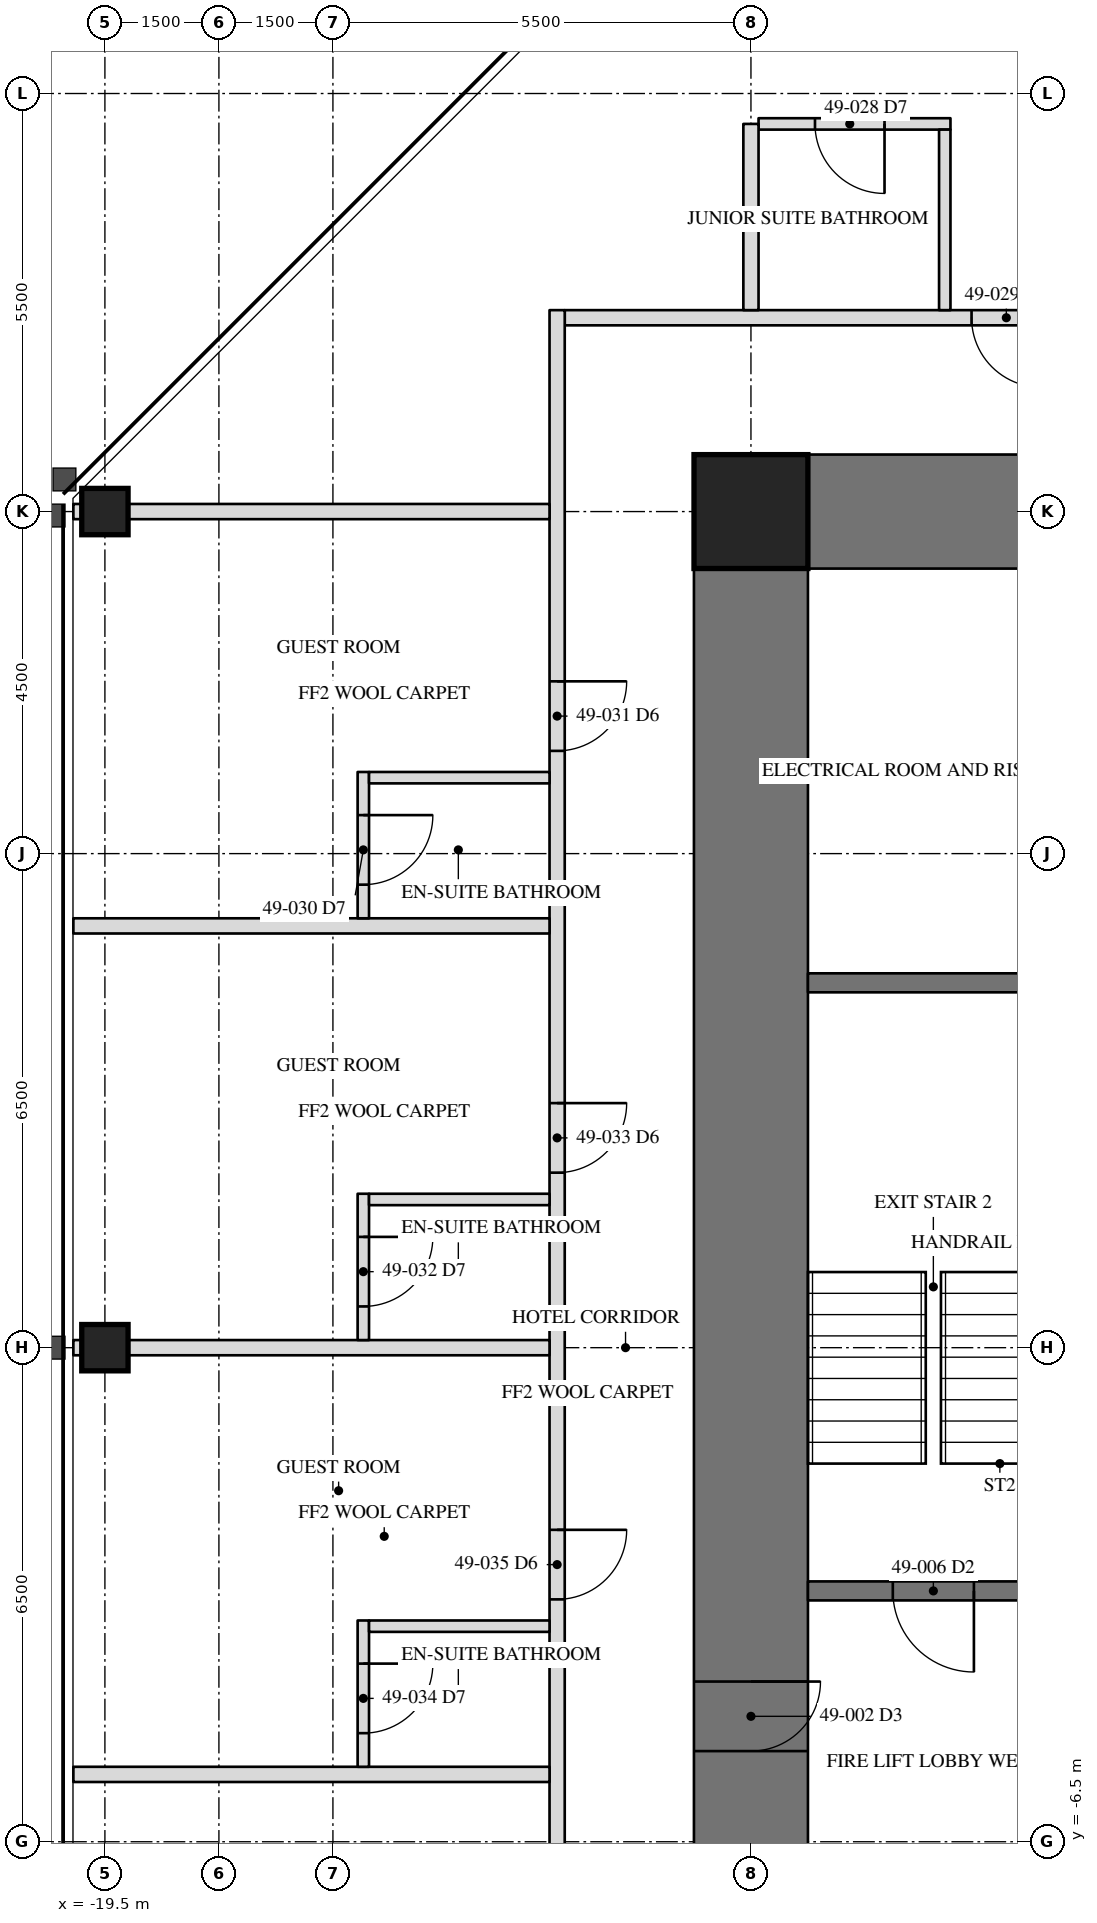
"""IFC4 building model, lengths in metres.
Left out: names, types, materials, properties, quantities, classifications, styles, units other than length and angle.
Written with IfcOpenShell. Run it as: python <this file> out.ifc"""

import sys

from ifc_helpers import new_model, si_unit, direction, frame, frame_2d, origin, origin_2d, place, context, subcontext, project, spatial, rectangle, hollow_rectangle, extrude, element, fill, save


model = new_model("IFC4")
c1 = context("Model", 3, precision=1e-05, world=origin(), true_north=direction((0.0, 1.0)))
c2 = subcontext(c1, "Body", "Model", "MODEL_VIEW")
j1 = project(units=[si_unit("LENGTHUNIT", "METRE"), si_unit("PLANEANGLEUNIT", "RADIAN")], contexts=[c1])
p1 = place(None, origin())
s1 = spatial("IfcSite", under=j1, at=p1, CompositionType="ELEMENT")
p2 = place(p1, origin())
s2 = spatial("IfcBuilding", under=s1, at=p2, CompositionType="ELEMENT")
p3 = place(p2, frame((0.0, 0.0, 208.2)))
s3 = spatial("IfcBuildingStorey", under=s2, at=p3, CompositionType="ELEMENT", Elevation=208.2)
for number, where, z_axis, x_axis in (
    (1, (-19.5, 0.0, 0.0), (0.0, 0.0, 1.0), (0.0, 1.0, 0.0)),
    (2, (-19.5, 11.0, 0.0), (0.0, 0.0, 1.0), (0.0, 1.0, 0.0)),
):
    element("IfcColumn", number, at=place(p3, frame(where, z_axis=z_axis, x_axis=x_axis)), inside=s3, PredefinedType="COLUMN", context=c2, shape_type="SweptSolid", body=[
        extrude(hollow_rectangle(XDim=0.61, YDim=0.61, WallThickness=0.076, at=origin_2d()), origin(), (0.0, 0.0, 1.0), 3.5),
    ])
p4 = place(p3, frame((-11.0, 11.0, 0.0), z_axis=(0.0, 0.0, 1.0), x_axis=(0.0, -1.0, 0.0)))
e3 = element("IfcWall", 3, at=p4, inside=s3, PredefinedType="SHEAR", context=c2, shape_type="SweptSolid", body=[
    extrude(rectangle(XDim=22.0, YDim=1.5, at=frame_2d((11.0, 0.0))), origin(), (0.0, 0.0, 1.0), 3.5),
])
p5 = place(p4, frame((15.393, 0.0, 0.0)))
e4 = element("IfcOpeningElement", 4, at=p5, cuts=e3, PredefinedType="OPENING", context=c2, shape_type="SweptSolid", body=[
    extrude(rectangle(XDim=0.915, YDim=2.134, at=frame_2d((0.458, 1.067))), frame((0.0, 0.76, 0.0), z_axis=(0.0, -1.0, 0.0), x_axis=(1.0, 0.0, 0.0)), (0.0, 0.0, 1.0), 1.52),
])
p6 = place(p3, frame((-6.5, 11.0, 0.0), z_axis=(0.0, 0.0, 1.0), x_axis=(-1.0, 0.0, 0.0)))
e5 = element("IfcWall", 5, at=p6, inside=s3, PredefinedType="SHEAR", context=c2, shape_type="SweptSolid", body=[
    extrude(rectangle(XDim=4.5, YDim=1.5, at=frame_2d((2.25, 0.0))), origin(), (0.0, 0.0, 1.0), 3.5),
])
p7 = place(p3, frame((-11.0, 11.0, 0.0), z_axis=(0.0, 0.0, 1.0), x_axis=(1.0, 0.0, 0.0)))
e6 = element("IfcColumn", 6, at=p7, inside=s3, PredefinedType="COLUMN", context=c2, shape_type="SweptSolid", body=[
    extrude(hollow_rectangle(XDim=1.499, YDim=1.499, WallThickness=0.102, at=origin_2d()), origin(), (0.0, 0.0, 1.0), 3.5),
])
p8 = place(p3, frame((-6.95, 4.8, 0.0), z_axis=(0.0, 0.0, 1.0), x_axis=(-1.0, 0.0, 0.0)))
e7 = element("IfcWall", 7, at=p8, inside=s3, PredefinedType="SOLIDWALL", context=c2, shape_type="SweptSolid", body=[
    extrude(rectangle(XDim=3.3, YDim=0.25, at=frame_2d((1.65, 0.0))), origin(), (0.0, 0.0, 1.0), 3.31),
])
p9 = place(p3, frame((-6.95, -3.2, 0.0), z_axis=(0.0, 0.0, 1.0), x_axis=(-1.0, 0.0, 0.0)))
e8 = element("IfcWall", 8, at=p9, inside=s3, PredefinedType="SOLIDWALL", context=c2, shape_type="SweptSolid", body=[
    extrude(rectangle(XDim=3.3, YDim=0.25, at=frame_2d((1.65, 0.0))), origin(), (0.0, 0.0, 1.0), 3.31),
])
p10 = place(p9, frame((1.116, 0.0, 0.0)))
e9 = element("IfcOpeningElement", 9, at=p10, cuts=e8, PredefinedType="OPENING", context=c2, shape_type="SweptSolid", body=[
    extrude(rectangle(XDim=1.067, YDim=2.134, at=frame_2d((0.533, 1.067))), frame((0.0, 0.135, 0.0), z_axis=(0.0, -1.0, 0.0), x_axis=(1.0, 0.0, 0.0)), (0.0, 0.0, 1.0), 0.27),
])
p11 = place(p3, frame((13.65, 13.55, 0.0), z_axis=(0.0, 0.0, 1.0), x_axis=(-1.0, 0.0, 0.0)))
e10 = element("IfcWall", 10, at=p11, inside=s3, PredefinedType="PARTITIONING", context=c2, shape_type="SweptSolid", body=[
    extrude(rectangle(XDim=27.1, YDim=0.2, at=frame_2d((13.55, 0.0))), origin(), (0.0, 0.0, 1.0), 3.31),
])
p12 = place(p11, frame((7.058, 0.0, 0.0)))
e11 = element("IfcOpeningElement", 11, at=p12, cuts=e10, PredefinedType="OPENING", context=c2, shape_type="SweptSolid", body=[
    extrude(rectangle(XDim=0.915, YDim=2.134, at=frame_2d((0.458, 1.067))), frame((0.0, 0.11, 0.0), z_axis=(0.0, -1.0, 0.0), x_axis=(1.0, 0.0, 0.0)), (0.0, 0.0, 1.0), 0.22),
])
p13 = place(p11, frame((13.24, 0.0, 0.0)))
e12 = element("IfcOpeningElement", 12, at=p13, cuts=e10, PredefinedType="OPENING", context=c2, shape_type="SweptSolid", body=[
    extrude(rectangle(XDim=0.915, YDim=2.134, at=frame_2d((0.458, 1.067))), frame((0.0, 0.11, 0.0), z_axis=(0.0, -1.0, 0.0), x_axis=(1.0, 0.0, 0.0)), (0.0, 0.0, 1.0), 0.22),
])
p14 = place(p11, frame((20.833, 0.0, 0.0)))
e13 = element("IfcOpeningElement", 13, at=p14, cuts=e10, PredefinedType="OPENING", context=c2, shape_type="SweptSolid", body=[
    extrude(rectangle(XDim=0.915, YDim=2.134, at=frame_2d((0.458, 1.067))), frame((0.0, 0.11, 0.0), z_axis=(0.0, -1.0, 0.0), x_axis=(1.0, 0.0, 0.0)), (0.0, 0.0, 1.0), 0.22),
])
p15 = place(p3, frame((-13.55, 13.65, 0.0), z_axis=(0.0, 0.0, 1.0), x_axis=(0.0, -1.0, 0.0)))
e14 = element("IfcWall", 14, at=p15, inside=s3, PredefinedType="PARTITIONING", context=c2, shape_type="SweptSolid", body=[
    extrude(rectangle(XDim=27.1, YDim=0.2, at=frame_2d((13.55, 0.0))), origin(), (0.0, 0.0, 1.0), 3.31),
])
p16 = place(p15, frame((4.884, 0.0, 0.0)))
e15 = element("IfcOpeningElement", 15, at=p16, cuts=e14, PredefinedType="OPENING", context=c2, shape_type="SweptSolid", body=[
    extrude(rectangle(XDim=0.915, YDim=2.134, at=frame_2d((0.458, 1.067))), frame((0.0, 0.11, 0.0), z_axis=(0.0, -1.0, 0.0), x_axis=(1.0, 0.0, 0.0)), (0.0, 0.0, 1.0), 0.22),
])
p17 = place(p15, frame((10.433, 0.0, 0.0)))
e16 = element("IfcOpeningElement", 16, at=p17, cuts=e14, PredefinedType="OPENING", context=c2, shape_type="SweptSolid", body=[
    extrude(rectangle(XDim=0.915, YDim=2.134, at=frame_2d((0.458, 1.067))), frame((0.0, 0.11, 0.0), z_axis=(0.0, -1.0, 0.0), x_axis=(1.0, 0.0, 0.0)), (0.0, 0.0, 1.0), 0.22),
])
p18 = place(p15, frame((16.046, 0.0, 0.0)))
e17 = element("IfcOpeningElement", 17, at=p18, cuts=e14, PredefinedType="OPENING", context=c2, shape_type="SweptSolid", body=[
    extrude(rectangle(XDim=0.915, YDim=2.134, at=frame_2d((0.458, 1.067))), frame((0.0, 0.11, 0.0), z_axis=(0.0, -1.0, 0.0), x_axis=(1.0, 0.0, 0.0)), (0.0, 0.0, 1.0), 0.22),
])
p19 = place(p15, frame((21.433, 0.0, 0.0)))
e18 = element("IfcOpeningElement", 18, at=p19, cuts=e14, PredefinedType="OPENING", context=c2, shape_type="SweptSolid", body=[
    extrude(rectangle(XDim=0.915, YDim=2.134, at=frame_2d((0.458, 1.067))), frame((0.0, 0.11, 0.0), z_axis=(0.0, -1.0, 0.0), x_axis=(1.0, 0.0, 0.0)), (0.0, 0.0, 1.0), 0.22),
])
p20 = place(p3, frame((-8.375, 16.1, 0.0), z_axis=(0.0, 0.0, 1.0), x_axis=(-1.0, 0.0, 0.0)))
e19 = element("IfcWall", 19, at=p20, inside=s3, PredefinedType="PARTITIONING", context=c2, shape_type="SweptSolid", body=[
    extrude(rectangle(XDim=2.525, YDim=0.15, at=frame_2d((1.262, 0.0))), origin(), (0.0, 0.0, 1.0), 3.31),
])
p21 = place(p20, frame((0.867, 0.0, 0.0)))
e20 = element("IfcOpeningElement", 20, at=p21, cuts=e19, PredefinedType="OPENING", context=c2, shape_type="SweptSolid", body=[
    extrude(rectangle(XDim=0.915, YDim=2.032, at=frame_2d((0.458, 1.016))), frame((0.0, 0.085, 0.0), z_axis=(0.0, -1.0, 0.0), x_axis=(1.0, 0.0, 0.0)), (0.0, 0.0, 1.0), 0.17),
])
p22 = place(p3, frame((-8.45, 13.65, 0.0), z_axis=(0.0, 0.0, 1.0), x_axis=(0.0, 1.0, 0.0)))
e21 = element("IfcWall", 21, at=p22, inside=s3, PredefinedType="PARTITIONING", context=c2, shape_type="SweptSolid", body=[
    extrude(rectangle(XDim=2.375, YDim=0.15, at=frame_2d((1.188, 0.0))), origin(), (0.0, 0.0, 1.0), 3.31),
])
p23 = place(p3, frame((-11.0, 13.65, 0.0), z_axis=(0.0, 0.0, 1.0), x_axis=(0.0, 1.0, 0.0)))
e22 = element("IfcWall", 22, at=p23, inside=s3, PredefinedType="PARTITIONING", context=c2, shape_type="SweptSolid", body=[
    extrude(rectangle(XDim=2.45, YDim=0.2, at=frame_2d((1.225, 0.0))), origin(), (0.0, 0.0, 1.0), 2.802),
])
p24 = place(p3, frame((-13.65, 11.0, 0.0), z_axis=(0.0, 0.0, 1.0), x_axis=(-1.0, 0.0, 0.0)))
e23 = element("IfcWall", 23, at=p24, inside=s3, PredefinedType="PARTITIONING", context=c2, shape_type="SweptSolid", body=[
    extrude(rectangle(XDim=6.265, YDim=0.2, at=frame_2d((3.133, 0.0))), origin(), (0.0, 0.0, 1.0), 2.802),
])
p25 = place(p3, frame((-13.65, 5.549, 0.0), z_axis=(0.0, 0.0, 1.0), x_axis=(-1.0, 0.0, 0.0)))
e24 = element("IfcWall", 24, at=p25, inside=s3, PredefinedType="PARTITIONING", context=c2, shape_type="SweptSolid", body=[
    extrude(rectangle(XDim=6.265, YDim=0.2, at=frame_2d((3.133, 0.0))), origin(), (0.0, 0.0, 1.0), 3.31),
])
p26 = place(p3, frame((-13.65, 0.0, 0.0), z_axis=(0.0, 0.0, 1.0), x_axis=(-1.0, 0.0, 0.0)))
e25 = element("IfcWall", 25, at=p26, inside=s3, PredefinedType="PARTITIONING", context=c2, shape_type="SweptSolid", body=[
    extrude(rectangle(XDim=6.265, YDim=0.2, at=frame_2d((3.133, 0.0))), origin(), (0.0, 0.0, 1.0), 2.802),
])
p27 = place(p3, frame((-13.65, -5.614, 0.0), z_axis=(0.0, 0.0, 1.0), x_axis=(-1.0, 0.0, 0.0)))
e26 = element("IfcWall", 26, at=p27, inside=s3, PredefinedType="PARTITIONING", context=c2, shape_type="SweptSolid", body=[
    extrude(rectangle(XDim=6.265, YDim=0.2, at=frame_2d((3.133, 0.0))), origin(), (0.0, 0.0, 1.0), 3.31),
])
p28 = place(p3, frame((-16.1, 7.574, 0.0), z_axis=(0.0, 0.0, 1.0), x_axis=(0.0, -1.0, 0.0)))
e27 = element("IfcWall", 27, at=p28, inside=s3, PredefinedType="PARTITIONING", context=c2, shape_type="SweptSolid", body=[
    extrude(rectangle(XDim=1.925, YDim=0.15, at=frame_2d((0.962, 0.0))), origin(), (0.0, 0.0, 1.0), 3.31),
])
p29 = place(p28, frame((0.567, 0.0, 0.0)))
e28 = element("IfcOpeningElement", 28, at=p29, cuts=e27, PredefinedType="OPENING", context=c2, shape_type="SweptSolid", body=[
    extrude(rectangle(XDim=0.915, YDim=2.032, at=frame_2d((0.458, 1.016))), frame((0.0, 0.085, 0.0), z_axis=(0.0, -1.0, 0.0), x_axis=(1.0, 0.0, 0.0)), (0.0, 0.0, 1.0), 0.17),
])
p30 = place(p3, frame((-13.65, 7.499, 0.0), z_axis=(0.0, 0.0, 1.0), x_axis=(-1.0, 0.0, 0.0)))
e29 = element("IfcWall", 29, at=p30, inside=s3, PredefinedType="PARTITIONING", context=c2, shape_type="SweptSolid", body=[
    extrude(rectangle(XDim=2.375, YDim=0.15, at=frame_2d((1.188, 0.0))), origin(), (0.0, 0.0, 1.0), 3.31),
])
p31 = place(p3, frame((-16.1, 2.025, 0.0), z_axis=(0.0, 0.0, 1.0), x_axis=(0.0, -1.0, 0.0)))
e30 = element("IfcWall", 30, at=p31, inside=s3, PredefinedType="PARTITIONING", context=c2, shape_type="SweptSolid", body=[
    extrude(rectangle(XDim=1.925, YDim=0.15, at=frame_2d((0.962, 0.0))), origin(), (0.0, 0.0, 1.0), 3.31),
])
p32 = place(p31, frame((0.567, 0.0, 0.0)))
e31 = element("IfcOpeningElement", 31, at=p32, cuts=e30, PredefinedType="OPENING", context=c2, shape_type="SweptSolid", body=[
    extrude(rectangle(XDim=0.915, YDim=2.032, at=frame_2d((0.458, 1.016))), frame((0.0, 0.085, 0.0), z_axis=(0.0, -1.0, 0.0), x_axis=(1.0, 0.0, 0.0)), (0.0, 0.0, 1.0), 0.17),
])
p33 = place(p3, frame((-13.65, 1.95, 0.0), z_axis=(0.0, 0.0, 1.0), x_axis=(-1.0, 0.0, 0.0)))
e32 = element("IfcWall", 32, at=p33, inside=s3, PredefinedType="PARTITIONING", context=c2, shape_type="SweptSolid", body=[
    extrude(rectangle(XDim=2.375, YDim=0.15, at=frame_2d((1.188, 0.0))), origin(), (0.0, 0.0, 1.0), 3.31),
])
p34 = place(p3, frame((-16.1, -3.589, 0.0), z_axis=(0.0, 0.0, 1.0), x_axis=(0.0, -1.0, 0.0)))
e33 = element("IfcWall", 33, at=p34, inside=s3, PredefinedType="PARTITIONING", context=c2, shape_type="SweptSolid", body=[
    extrude(rectangle(XDim=1.925, YDim=0.15, at=frame_2d((0.962, 0.0))), origin(), (0.0, 0.0, 1.0), 3.31),
])
p35 = place(p34, frame((0.567, 0.0, 0.0)))
e34 = element("IfcOpeningElement", 34, at=p35, cuts=e33, PredefinedType="OPENING", context=c2, shape_type="SweptSolid", body=[
    extrude(rectangle(XDim=0.915, YDim=2.032, at=frame_2d((0.458, 1.016))), frame((0.0, 0.085, 0.0), z_axis=(0.0, -1.0, 0.0), x_axis=(1.0, 0.0, 0.0)), (0.0, 0.0, 1.0), 0.17),
])
p36 = place(p3, frame((-13.65, -3.664, 0.0), z_axis=(0.0, 0.0, 1.0), x_axis=(-1.0, 0.0, 0.0)))
e35 = element("IfcWall", 35, at=p36, inside=s3, PredefinedType="PARTITIONING", context=c2, shape_type="SweptSolid", body=[
    extrude(rectangle(XDim=2.375, YDim=0.15, at=frame_2d((1.188, 0.0))), origin(), (0.0, 0.0, 1.0), 2.703),
])
p37 = place(p5, origin())
e36 = element("IfcDoor", 36, at=p37, inside=s3, OperationType="SINGLE_SWING_RIGHT", PredefinedType="DOOR", context=c2, shape_type="SweptSolid", body=[
    extrude(rectangle(XDim=0.915, YDim=2.134, at=frame_2d((0.458, 1.067))), frame((0.0, -0.675, 0.0), z_axis=(0.0, -1.0, 0.0), x_axis=(1.0, 0.0, 0.0)), (0.0, 0.0, 1.0), 0.05),
])
fill(e4, e36)
p38 = place(p10, origin())
e37 = element("IfcDoor", 37, at=p38, inside=s3, OperationType="SINGLE_SWING_LEFT", PredefinedType="DOOR", context=c2, shape_type="SweptSolid", body=[
    extrude(rectangle(XDim=1.067, YDim=2.134, at=frame_2d((0.533, 1.067))), frame((0.0, 0.025, 0.0), z_axis=(0.0, -1.0, 0.0), x_axis=(1.0, 0.0, 0.0)), (0.0, 0.0, 1.0), 0.05),
])
fill(e9, e37)
p39 = place(p21, origin())
e38 = element("IfcDoor", 38, at=p39, inside=s3, OperationType="SINGLE_SWING_LEFT", PredefinedType="DOOR", context=c2, shape_type="SweptSolid", body=[
    extrude(rectangle(XDim=0.915, YDim=2.032, at=frame_2d((0.458, 1.016))), frame((0.0, 0.025, 0.0), z_axis=(0.0, -1.0, 0.0), x_axis=(1.0, 0.0, 0.0)), (0.0, 0.0, 1.0), 0.05),
])
fill(e20, e38)
p40 = place(p14, origin())
e39 = element("IfcDoor", 39, at=p40, inside=s3, OperationType="SINGLE_SWING_LEFT", PredefinedType="DOOR", context=c2, shape_type="SweptSolid", body=[
    extrude(rectangle(XDim=0.915, YDim=2.134, at=frame_2d((0.458, 1.067))), frame((0.0, 0.025, 0.0), z_axis=(0.0, -1.0, 0.0), x_axis=(1.0, 0.0, 0.0)), (0.0, 0.0, 1.0), 0.05),
])
fill(e13, e39)
p41 = place(p29, origin())
e40 = element("IfcDoor", 40, at=p41, inside=s3, OperationType="SINGLE_SWING_LEFT", PredefinedType="DOOR", context=c2, shape_type="SweptSolid", body=[
    extrude(rectangle(XDim=0.915, YDim=2.032, at=frame_2d((0.458, 1.016))), frame((0.0, 0.025, 0.0), z_axis=(0.0, -1.0, 0.0), x_axis=(1.0, 0.0, 0.0)), (0.0, 0.0, 1.0), 0.05),
])
fill(e28, e40)
p42 = place(p16, origin())
e41 = element("IfcDoor", 41, at=p42, inside=s3, OperationType="SINGLE_SWING_LEFT", PredefinedType="DOOR", context=c2, shape_type="SweptSolid", body=[
    extrude(rectangle(XDim=0.915, YDim=2.134, at=frame_2d((0.458, 1.067))), frame((0.0, 0.025, 0.0), z_axis=(0.0, -1.0, 0.0), x_axis=(1.0, 0.0, 0.0)), (0.0, 0.0, 1.0), 0.05),
])
fill(e15, e41)
p43 = place(p32, origin())
e42 = element("IfcDoor", 42, at=p43, inside=s3, OperationType="SINGLE_SWING_LEFT", PredefinedType="DOOR", context=c2, shape_type="SweptSolid", body=[
    extrude(rectangle(XDim=0.915, YDim=2.032, at=frame_2d((0.458, 1.016))), frame((0.0, 0.025, 0.0), z_axis=(0.0, -1.0, 0.0), x_axis=(1.0, 0.0, 0.0)), (0.0, 0.0, 1.0), 0.05),
])
fill(e31, e42)
p44 = place(p17, origin())
e43 = element("IfcDoor", 43, at=p44, inside=s3, OperationType="SINGLE_SWING_LEFT", PredefinedType="DOOR", context=c2, shape_type="SweptSolid", body=[
    extrude(rectangle(XDim=0.915, YDim=2.134, at=frame_2d((0.458, 1.067))), frame((0.0, 0.025, 0.0), z_axis=(0.0, -1.0, 0.0), x_axis=(1.0, 0.0, 0.0)), (0.0, 0.0, 1.0), 0.05),
])
fill(e16, e43)
p45 = place(p35, origin())
e44 = element("IfcDoor", 44, at=p45, inside=s3, OperationType="SINGLE_SWING_LEFT", PredefinedType="DOOR", context=c2, shape_type="SweptSolid", body=[
    extrude(rectangle(XDim=0.915, YDim=2.032, at=frame_2d((0.458, 1.016))), frame((0.0, 0.025, 0.0), z_axis=(0.0, -1.0, 0.0), x_axis=(1.0, 0.0, 0.0)), (0.0, 0.0, 1.0), 0.05),
])
fill(e34, e44)
p46 = place(p18, origin())
e45 = element("IfcDoor", 45, at=p46, inside=s3, OperationType="SINGLE_SWING_LEFT", PredefinedType="DOOR", context=c2, shape_type="SweptSolid", body=[
    extrude(rectangle(XDim=0.915, YDim=2.134, at=frame_2d((0.458, 1.067))), frame((0.0, 0.025, 0.0), z_axis=(0.0, -1.0, 0.0), x_axis=(1.0, 0.0, 0.0)), (0.0, 0.0, 1.0), 0.05),
])
fill(e17, e45)
save(model, sys.argv[1])
